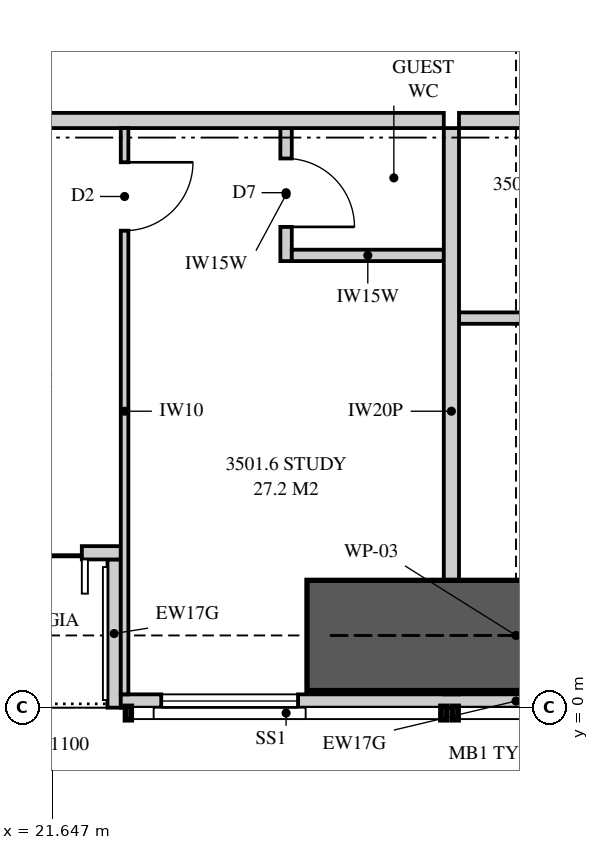
"""IFC4 building model, lengths in metres.
Left out: names, types, materials, properties, quantities, classifications, styles, units other than length and angle.
Written with IfcOpenShell. Run it as: python <this file> out.ifc"""

import sys

from ifc_helpers import new_model, si_unit, direction, frame, frame_2d, origin, place, context, subcontext, project, spatial, polyline, rectangle, outline, extrude, element, fill, save


model = new_model("IFC4")
c1 = context("Model", 3, precision=1e-05, world=origin(), true_north=direction((0.0, 1.0)))
c2 = subcontext(c1, "Body", "Model", "MODEL_VIEW")
j1 = project(units=[si_unit("LENGTHUNIT", "METRE"), si_unit("PLANEANGLEUNIT", "RADIAN")], contexts=[c1])
p1 = place(None, origin())
s1 = spatial("IfcSite", under=j1, at=p1, CompositionType="ELEMENT")
p2 = place(p1, origin())
s2 = spatial("IfcBuilding", under=s1, at=p2, CompositionType="ELEMENT")
p3 = place(p2, frame((0.0, 0.0, 128.3)))
s3 = spatial("IfcBuildingStorey", under=s2, at=p3, CompositionType="ELEMENT", Elevation=128.3)
p4 = place(p3, frame((22.55, 0.087, 0.0), z_axis=(0.0, 0.0, 1.0), x_axis=(1.0, 0.0, 0.0)))
e1 = element("IfcWall", 1, at=p4, inside=s3, PredefinedType="SOLIDWALL", context=c2, shape_type="SweptSolid", body=[
    extrude(rectangle(XDim=10.4, YDim=0.175, at=frame_2d((5.2, 0.0))), origin(), (0.0, 0.0, 1.0), 2.15),
])
p5 = place(p4, frame((0.532, 0.0, 0.4)))
e2 = element("IfcOpeningElement", 2, at=p5, cuts=e1, PredefinedType="OPENING", context=c2, shape_type="SweptSolid", body=[
    extrude(rectangle(XDim=1.8, YDim=1.7, at=frame_2d((0.9, 0.85))), frame((0.0, 0.097, 0.0), z_axis=(0.0, -1.0, 0.0), x_axis=(1.0, 0.0, 0.0)), (0.0, 0.0, 1.0), 0.195),
])
p6 = place(p4, frame((8.065, 0.0, 0.4)))
e3 = element("IfcOpeningElement", 3, at=p6, cuts=e1, PredefinedType="OPENING", context=c2, shape_type="SweptSolid", body=[
    extrude(rectangle(XDim=1.8, YDim=1.7, at=frame_2d((0.9, 0.85))), frame((0.0, 0.097, 0.0), z_axis=(0.0, -1.0, 0.0), x_axis=(1.0, 0.0, 0.0)), (0.0, 0.0, 1.0), 0.195),
])
p7 = place(p3, frame((19.725, 2.038, 0.0), z_axis=(0.0, 0.0, 1.0), x_axis=(1.0, 0.0, 0.0)))
e4 = element("IfcWall", 4, at=p7, inside=s3, PredefinedType="SOLIDWALL", context=c2, shape_type="SweptSolid", body=[
    extrude(rectangle(XDim=2.825, YDim=0.175, at=frame_2d((1.413, 0.0))), origin(), (0.0, 0.0, 1.0), 3.11),
])
p8 = place(p7, frame((0.512, 0.0, 0.0)))
e5 = element("IfcOpeningElement", 5, at=p8, cuts=e4, PredefinedType="OPENING", context=c2, shape_type="SweptSolid", body=[
    extrude(rectangle(XDim=1.8, YDim=2.1, at=frame_2d((0.9, 1.05))), frame((0.0, 0.097, 0.0), z_axis=(0.0, -1.0, 0.0), x_axis=(1.0, 0.0, 0.0)), (0.0, 0.0, 1.0), 0.195),
])
p9 = place(p3, frame((22.462, 0.0, 0.0), z_axis=(0.0, 0.0, 1.0), x_axis=(0.0, 1.0, 0.0)))
e6 = element("IfcWall", 6, at=p9, inside=s3, PredefinedType="SOLIDWALL", context=c2, shape_type="SweptSolid", body=[
    extrude(outline(polyline([(0.0, 0.0), (1.95, 0.0), (1.95, 3.11), (1.75, 3.11), (1.75, 2.15), (0.15, 2.15), (0.15, 3.11), (0.0, 3.11), (0.0, 0.0)])), frame((0.0, 0.087, 0.0), z_axis=(0.0, -1.0, 0.0), x_axis=(1.0, 0.0, 0.0)), (0.0, 0.0, 1.0), 0.175),
])
p10 = place(p3, frame((26.9, 0.175, 0.0), z_axis=(0.0, 0.0, 1.0), x_axis=(0.0, 1.0, 0.0)))
e7 = element("IfcWall", 7, at=p10, inside=s3, PredefinedType="PARTITIONING", context=c2, shape_type="SweptSolid", body=[
    extrude(outline(polyline([(0.529, 2.15), (0.0, 2.15), (0.0, 0.0), (0.529, 0.0), (0.529, 0.923), (1.021, 0.923), (1.021, 0.0), (7.45, 0.0), (7.45, 3.11), (1.685, 3.11), (1.685, 2.15), (1.021, 2.15), (1.021, 1.227), (0.529, 1.227), (0.529, 2.15)])), frame((0.0, 0.1, 0.0), z_axis=(0.0, -1.0, 0.0), x_axis=(1.0, 0.0, 0.0)), (0.0, 0.0, 1.0), 0.2),
])
p11 = place(p3, frame((17.775, 7.725, 0.0), z_axis=(0.0, 0.0, 1.0), x_axis=(1.0, 0.0, 0.0)))
e8 = element("IfcWall", 8, at=p11, inside=s3, PredefinedType="PARTITIONING", context=c2, shape_type="SweptSolid", body=[
    extrude(rectangle(XDim=9.025, YDim=0.2, at=frame_2d((4.513, 0.0))), origin(), (0.0, 0.0, 1.0), 3.11),
])
p12 = place(p11, frame((0.2, 0.0, 0.0)))
e9 = element("IfcOpeningElement", 9, at=p12, cuts=e8, PredefinedType="OPENING", context=c2, shape_type="SweptSolid", body=[
    extrude(rectangle(XDim=1.05, YDim=2.2, at=frame_2d((0.525, 1.1))), frame((0.0, 0.11, 0.0), z_axis=(0.0, -1.0, 0.0), x_axis=(1.0, 0.0, 0.0)), (0.0, 0.0, 1.0), 0.22),
])
p13 = place(p3, frame((22.6, 0.175, 0.0), z_axis=(0.0, 0.0, 1.0), x_axis=(0.0, 1.0, 0.0)))
e10 = element("IfcWall", 10, at=p13, inside=s3, PredefinedType="PARTITIONING", context=c2, shape_type="SweptSolid", body=[
    extrude(outline(polyline([(0.0, 0.0), (7.45, 0.0), (7.45, 3.11), (1.635, 3.11), (1.635, 2.15), (0.0, 2.15), (0.0, 3.11), (0.0, 0.0)])), frame((0.0, 0.05, 0.0), z_axis=(0.0, -1.0, 0.0), x_axis=(1.0, 0.0, 0.0)), (0.0, 0.0, 1.0), 0.1),
])
p14 = place(p13, frame((6.1, 0.0, 0.0)))
e11 = element("IfcOpeningElement", 11, at=p14, cuts=e10, PredefinedType="OPENING", context=c2, shape_type="SweptSolid", body=[
    extrude(rectangle(XDim=0.9, YDim=2.1, at=frame_2d((0.45, 1.05))), frame((0.0, 0.06, 0.0), z_axis=(0.0, -1.0, 0.0), x_axis=(1.0, 0.0, 0.0)), (0.0, 0.0, 1.0), 0.12),
])
p15 = place(p3, frame((27.0, 7.725, 0.0), z_axis=(0.0, 0.0, 1.0), x_axis=(1.0, 0.0, 0.0)))
e12 = element("IfcWall", 12, at=p15, inside=s3, PredefinedType="PARTITIONING", context=c2, shape_type="SweptSolid", body=[
    extrude(outline(polyline([(0.0, 0.0), (9.8, 0.0), (9.8, 3.11), (1.087, 3.11), (1.087, 2.541), (0.413, 2.541), (0.413, 3.11), (0.0, 3.11), (0.0, 0.0)])), frame((0.0, 0.1, 0.0), z_axis=(0.0, -1.0, 0.0), x_axis=(1.0, 0.0, 0.0)), (0.0, 0.0, 1.0), 0.2),
])
p16 = place(p3, frame((27.0, 5.125, 0.0), z_axis=(0.0, 0.0, 1.0), x_axis=(1.0, 0.0, 0.0)))
e13 = element("IfcWall", 13, at=p16, inside=s3, PredefinedType="PLUMBINGWALL", context=c2, shape_type="SweptSolid", body=[
    extrude(outline(polyline([(0.0, 0.0), (5.85, 0.0), (5.85, 3.11), (1.062, 3.11), (1.062, 2.541), (0.438, 2.541), (0.438, 3.11), (0.0, 3.11), (0.0, 0.0)])), frame((0.0, 0.075, 0.0), z_axis=(0.0, -1.0, 0.0), x_axis=(1.0, 0.0, 0.0)), (0.0, 0.0, 1.0), 0.15),
])
p17 = place(p16, frame((4.55, 0.0, 0.0)))
e14 = element("IfcOpeningElement", 14, at=p17, cuts=e13, PredefinedType="OPENING", context=c2, shape_type="SweptSolid", body=[
    extrude(rectangle(XDim=0.9, YDim=2.1, at=frame_2d((0.45, 1.05))), frame((0.0, 0.085, 0.0), z_axis=(0.0, -1.0, 0.0), x_axis=(1.0, 0.0, 0.0)), (0.0, 0.0, 1.0), 0.17),
])
p18 = place(p3, frame((24.725, 7.625, 0.0), z_axis=(0.0, 0.0, 1.0), x_axis=(0.0, -1.0, 0.0)))
e15 = element("IfcWall", 15, at=p18, inside=s3, PredefinedType="PLUMBINGWALL", context=c2, shape_type="SweptSolid", body=[
    extrude(rectangle(XDim=1.75, YDim=0.15, at=frame_2d((0.875, 0.0))), origin(), (0.0, 0.0, 1.0), 3.11),
])
p19 = place(p18, frame((0.4, 0.0, 0.0)))
e16 = element("IfcOpeningElement", 16, at=p19, cuts=e15, PredefinedType="OPENING", context=c2, shape_type="SweptSolid", body=[
    extrude(rectangle(XDim=0.9, YDim=2.1, at=frame_2d((0.45, 1.05))), frame((0.0, 0.085, 0.0), z_axis=(0.0, -1.0, 0.0), x_axis=(1.0, 0.0, 0.0)), (0.0, 0.0, 1.0), 0.17),
])
p20 = place(p3, frame((26.8, 5.95, 0.0), z_axis=(0.0, 0.0, 1.0), x_axis=(-1.0, 0.0, 0.0)))
e17 = element("IfcWall", 17, at=p20, inside=s3, PredefinedType="PLUMBINGWALL", context=c2, shape_type="SweptSolid", body=[
    extrude(rectangle(XDim=2.0, YDim=0.15, at=frame_2d((1.0, 0.0))), origin(), (0.0, 0.0, 1.0), 3.11),
])
p21 = place(p3, frame((25.0, 0.95, 0.0), z_axis=(0.0, 0.0, 1.0), x_axis=(1.0, 0.0, 0.0)))
e18 = element("IfcWall", 18, at=p21, inside=s3, PredefinedType="SHEAR", context=c2, shape_type="SweptSolid", body=[
    extrude(rectangle(XDim=5.5, YDim=1.45, at=frame_2d((2.75, 0.0))), origin(), (0.0, 0.0, 1.0), 3.35),
])
p22 = place(p8, origin())
e19 = element("IfcDoor", 19, at=p22, inside=s3, OperationType="SLIDING_TO_LEFT", PredefinedType="DOOR", context=c2, shape_type="SweptSolid", body=[
    extrude(rectangle(XDim=1.8, YDim=2.1, at=frame_2d((0.9, 1.05))), frame((0.0, 0.025, 0.0), z_axis=(0.0, -1.0, 0.0), x_axis=(1.0, 0.0, 0.0)), (0.0, 0.0, 1.0), 0.05),
])
fill(e5, e19)
p23 = place(p5, origin())
e20 = element("IfcWindow", 20, at=p23, inside=s3, PartitioningType="SINGLE_PANEL", PredefinedType="WINDOW", context=c2, shape_type="SweptSolid", body=[
    extrude(rectangle(XDim=1.8, YDim=1.7, at=frame_2d((0.9, 0.85))), frame((0.0, 0.03, 0.0), z_axis=(0.0, -1.0, 0.0), x_axis=(1.0, 0.0, 0.0)), (0.0, 0.0, 1.0), 0.06),
])
fill(e2, e20)
p24 = place(p14, frame((0.9, 0.0, 0.0), z_axis=(0.0, 0.0, 1.0), x_axis=(-1.0, 0.0, 0.0)))
e21 = element("IfcDoor", 21, at=p24, inside=s3, OperationType="SINGLE_SWING_LEFT", PredefinedType="DOOR", context=c2, shape_type="SweptSolid", body=[
    extrude(rectangle(XDim=0.9, YDim=2.1, at=frame_2d((0.45, 1.05))), frame((0.0, 0.025, 0.0), z_axis=(0.0, -1.0, 0.0), x_axis=(1.0, 0.0, 0.0)), (0.0, 0.0, 1.0), 0.05),
])
fill(e11, e21)
p25 = place(p19, origin())
e22 = element("IfcDoor", 22, at=p25, inside=s3, OperationType="SINGLE_SWING_RIGHT", PredefinedType="DOOR", context=c2, shape_type="SweptSolid", body=[
    extrude(rectangle(XDim=0.9, YDim=2.1, at=frame_2d((0.45, 1.05))), frame((0.0, 0.025, 0.0), z_axis=(0.0, -1.0, 0.0), x_axis=(1.0, 0.0, 0.0)), (0.0, 0.0, 1.0), 0.05),
])
fill(e16, e22)
save(model, sys.argv[1])
